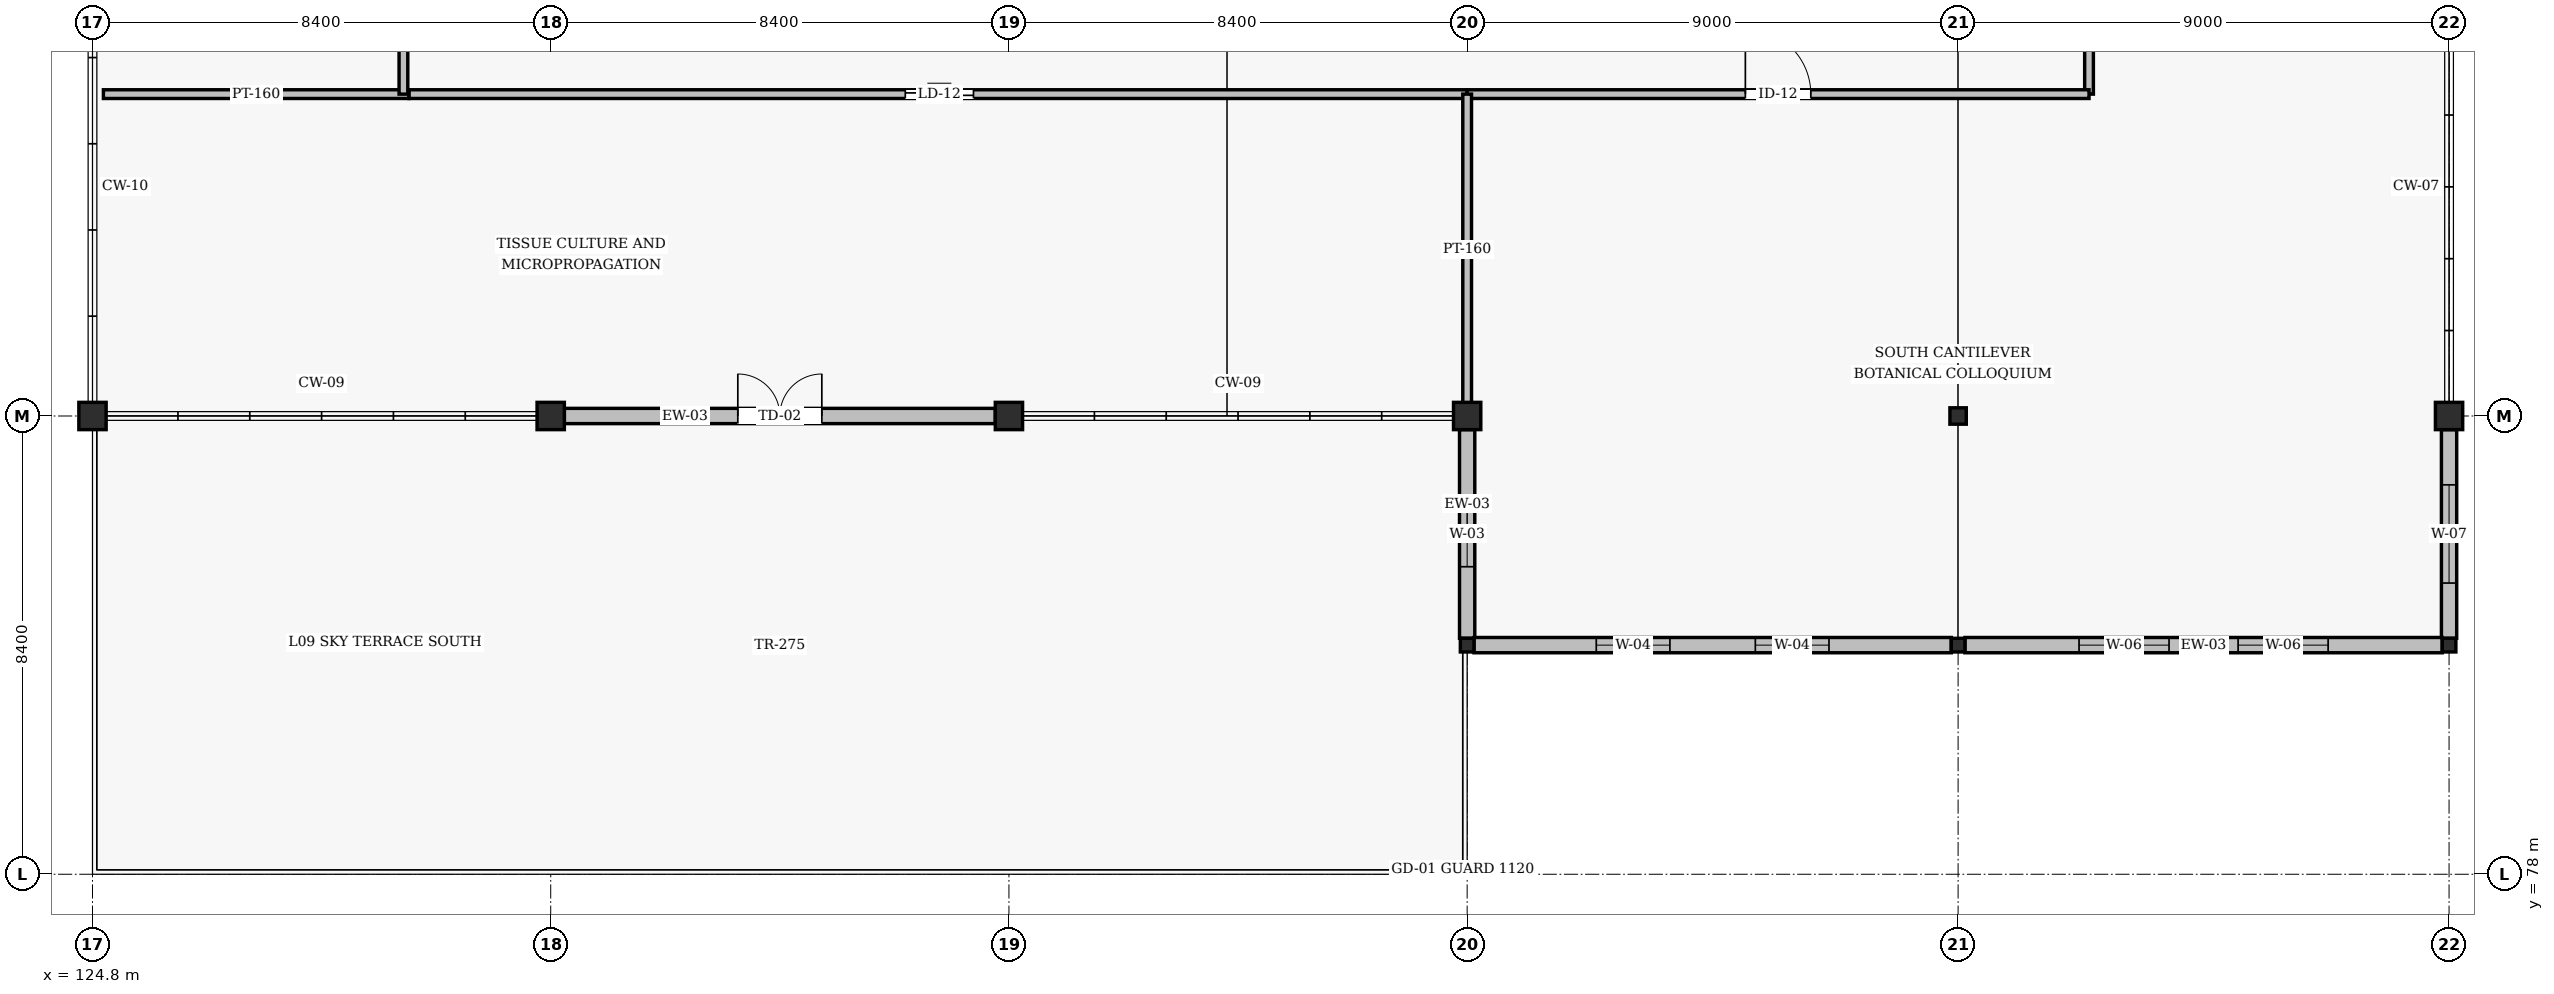
"""IFC4 building model, lengths in metres.
Left out: names, types, materials, properties, quantities, classifications, styles, units other than length and angle.
Written with IfcOpenShell. Run it as: python <this file> out.ifc"""

import sys

from ifc_helpers import new_model, si_unit, direction, frame, frame_2d, origin, origin_2d, place, context, subcontext, project, spatial, rectangle, hollow_rectangle, i_section, extrude, element, fill, save


model = new_model("IFC4")
c1 = context("Model", 3, precision=1e-05, world=origin(), true_north=direction((0.0, 1.0)))
c2 = subcontext(c1, "Body", "Model", "MODEL_VIEW")
j1 = project(units=[si_unit("LENGTHUNIT", "METRE"), si_unit("PLANEANGLEUNIT", "RADIAN")], contexts=[c1])
p1 = place(None, origin())
s1 = spatial("IfcSite", under=j1, at=p1, CompositionType="ELEMENT")
p2 = place(p1, origin())
s2 = spatial("IfcBuilding", under=s1, at=p2, CompositionType="ELEMENT")
p3 = place(p2, frame((0.0, 0.0, 35.4)))
s3 = spatial("IfcBuildingStorey", under=s2, at=p3, CompositionType="ELEMENT", Elevation=35.4)
for number, where, z_axis, x_axis in (
    (1, (124.8, 86.4, 0.0), (0.0, 0.0, 1.0), (1.0, 0.0, 0.0)),
    (2, (133.2, 86.4, 0.0), (0.0, 0.0, 1.0), (1.0, 0.0, 0.0)),
    (3, (141.6, 86.4, 0.0), (0.0, 0.0, 1.0), (1.0, 0.0, 0.0)),
):
    element("IfcColumn", number, at=place(p3, frame(where, z_axis=z_axis, x_axis=x_axis)), inside=s3, PredefinedType="COLUMN", context=c2, shape_type="SweptSolid", body=[
        extrude(hollow_rectangle(XDim=0.5, YDim=0.5, WallThickness=0.02, InnerFilletRadius=0.02, OuterFilletRadius=0.04, at=origin_2d()), origin(), (0.0, 0.0, 1.0), 4.2),
    ])
p4 = place(p3, frame((150.0, 82.2, -0.305), z_axis=(0.0, 0.0, 1.0), x_axis=(1.0, 0.0, 0.0)))
e4 = element("IfcColumn", 4, at=p4, inside=s3, PredefinedType="COLUMN", context=c2, shape_type="SweptSolid", body=[
    extrude(i_section(OverallWidth=0.25, OverallDepth=0.25, WebThickness=0.009, FlangeThickness=0.014, FilletRadius=0.016, at=origin_2d()), origin(), (0.0, 0.0, 1.0), 4.505),
])
p5 = place(p3, frame((150.0, 86.4, 0.0), z_axis=(0.0, 0.0, 1.0), x_axis=(1.0, 0.0, 0.0)))
e5 = element("IfcColumn", 5, at=p5, inside=s3, PredefinedType="COLUMN", context=c2, shape_type="SweptSolid", body=[
    extrude(hollow_rectangle(XDim=0.5, YDim=0.5, WallThickness=0.02, InnerFilletRadius=0.02, OuterFilletRadius=0.04, at=origin_2d()), origin(), (0.0, 0.0, 1.0), 4.2),
])
p6 = place(p3, frame((159.0, 82.2, -0.305), z_axis=(0.0, 0.0, 1.0), x_axis=(1.0, 0.0, 0.0)))
e6 = element("IfcColumn", 6, at=p6, inside=s3, PredefinedType="COLUMN", context=c2, shape_type="SweptSolid", body=[
    extrude(i_section(OverallWidth=0.25, OverallDepth=0.25, WebThickness=0.009, FlangeThickness=0.014, FilletRadius=0.016, at=origin_2d()), origin(), (0.0, 0.0, 1.0), 4.505),
])
p7 = place(p3, frame((159.0, 86.4, 0.0), z_axis=(0.0, 0.0, 1.0), x_axis=(1.0, 0.0, 0.0)))
e7 = element("IfcColumn", 7, at=p7, inside=s3, PredefinedType="COLUMN", context=c2, shape_type="SweptSolid", body=[
    extrude(i_section(OverallWidth=0.3, OverallDepth=0.3, WebThickness=0.01, FlangeThickness=0.015, FilletRadius=0.018, at=origin_2d()), origin(), (0.0, 0.0, 1.0), 4.2),
])
p8 = place(p3, frame((168.0, 82.2, -0.305), z_axis=(0.0, 0.0, 1.0), x_axis=(1.0, 0.0, 0.0)))
e8 = element("IfcColumn", 8, at=p8, inside=s3, PredefinedType="COLUMN", context=c2, shape_type="SweptSolid", body=[
    extrude(i_section(OverallWidth=0.25, OverallDepth=0.25, WebThickness=0.009, FlangeThickness=0.014, FilletRadius=0.016, at=origin_2d()), origin(), (0.0, 0.0, 1.0), 4.505),
])
p9 = place(p3, frame((168.0, 86.4, 0.0), z_axis=(0.0, 0.0, 1.0), x_axis=(1.0, 0.0, 0.0)))
e9 = element("IfcColumn", 9, at=p9, inside=s3, PredefinedType="COLUMN", context=c2, shape_type="SweptSolid", body=[
    extrude(hollow_rectangle(XDim=0.5, YDim=0.5, WallThickness=0.02, InnerFilletRadius=0.02, OuterFilletRadius=0.04, at=origin_2d()), origin(), (0.0, 0.0, 1.0), 4.2),
])
p10 = place(p3, frame((168.0, 82.325, 0.0), z_axis=(0.0, 0.0, 1.0), x_axis=(0.0, 1.0, 0.0)))
e10 = element("IfcWall", 10, at=p10, inside=s3, PredefinedType="SOLIDWALL", context=c2, shape_type="SweptSolid", body=[
    extrude(rectangle(XDim=3.825, YDim=0.28, at=frame_2d((1.913, 0.0))), origin(), (0.0, 0.0, 1.0), 3.454),
])
p11 = place(p10, frame((1.013, 0.0, 0.85)))
e11 = element("IfcOpeningElement", 11, at=p11, cuts=e10, PredefinedType="OPENING", context=c2, shape_type="SweptSolid", body=[
    extrude(rectangle(XDim=1.8, YDim=2.1, at=frame_2d((0.9, 1.05))), frame((0.0, 0.15, 0.0), z_axis=(0.0, -1.0, 0.0), x_axis=(1.0, 0.0, 0.0)), (0.0, 0.0, 1.0), 0.3),
])
p12 = place(p3, frame((133.45, 86.4, 0.0), z_axis=(0.0, 0.0, 1.0), x_axis=(1.0, 0.0, 0.0)))
e12 = element("IfcWall", 12, at=p12, inside=s3, PredefinedType="SOLIDWALL", context=c2, shape_type="SweptSolid", body=[
    extrude(rectangle(XDim=7.9, YDim=0.28, at=frame_2d((3.95, 0.0))), origin(), (0.0, 0.0, 1.0), 3.448),
])
p13 = place(p12, frame((3.18, 0.0, 0.0)))
e13 = element("IfcOpeningElement", 13, at=p13, cuts=e12, PredefinedType="OPENING", context=c2, shape_type="SweptSolid", body=[
    extrude(rectangle(XDim=1.54, YDim=2.24, at=frame_2d((0.77, 1.12))), frame((0.0, 0.15, 0.0), z_axis=(0.0, -1.0, 0.0), x_axis=(1.0, 0.0, 0.0)), (0.0, 0.0, 1.0), 0.3),
])
p14 = place(p3, frame((150.0, 86.15, 0.0), z_axis=(0.0, 0.0, 1.0), x_axis=(0.0, -1.0, 0.0)))
e14 = element("IfcWall", 14, at=p14, inside=s3, PredefinedType="SOLIDWALL", context=c2, shape_type="SweptSolid", body=[
    extrude(rectangle(XDim=3.825, YDim=0.28, at=frame_2d((1.913, 0.0))), origin(), (0.0, 0.0, 1.0), 3.454),
])
p15 = place(p14, frame((1.313, 0.0, 0.85)))
e15 = element("IfcOpeningElement", 15, at=p15, cuts=e14, PredefinedType="OPENING", context=c2, shape_type="SweptSolid", body=[
    extrude(rectangle(XDim=1.2, YDim=2.1, at=frame_2d((0.6, 1.05))), frame((0.0, 0.15, 0.0), z_axis=(0.0, -1.0, 0.0), x_axis=(1.0, 0.0, 0.0)), (0.0, 0.0, 1.0), 0.3),
])
p16 = place(p3, frame((150.125, 82.2, 0.0), z_axis=(0.0, 0.0, 1.0), x_axis=(1.0, 0.0, 0.0)))
e16 = element("IfcWall", 16, at=p16, inside=s3, PredefinedType="SOLIDWALL", context=c2, shape_type="SweptSolid", body=[
    extrude(rectangle(XDim=8.75, YDim=0.28, at=frame_2d((4.375, 0.0))), origin(), (0.0, 0.0, 1.0), 3.156),
])
p17 = place(p16, frame((2.242, 0.0, 0.85)))
e17 = element("IfcOpeningElement", 17, at=p17, cuts=e16, PredefinedType="OPENING", context=c2, shape_type="SweptSolid", body=[
    extrude(rectangle(XDim=1.35, YDim=2.01, at=frame_2d((0.675, 1.005))), frame((0.0, 0.15, 0.0), z_axis=(0.0, -1.0, 0.0), x_axis=(1.0, 0.0, 0.0)), (0.0, 0.0, 1.0), 0.3),
])
p18 = place(p16, frame((5.158, 0.0, 0.85)))
e18 = element("IfcOpeningElement", 18, at=p18, cuts=e16, PredefinedType="OPENING", context=c2, shape_type="SweptSolid", body=[
    extrude(rectangle(XDim=1.35, YDim=2.01, at=frame_2d((0.675, 1.005))), frame((0.0, 0.15, 0.0), z_axis=(0.0, -1.0, 0.0), x_axis=(1.0, 0.0, 0.0)), (0.0, 0.0, 1.0), 0.3),
])
p19 = place(p3, frame((159.125, 82.2, 0.0), z_axis=(0.0, 0.0, 1.0), x_axis=(1.0, 0.0, 0.0)))
e19 = element("IfcWall", 19, at=p19, inside=s3, PredefinedType="SOLIDWALL", context=c2, shape_type="SweptSolid", body=[
    extrude(rectangle(XDim=8.75, YDim=0.28, at=frame_2d((4.375, 0.0))), origin(), (0.0, 0.0, 1.0), 3.156),
])
p20 = place(p19, frame((2.092, 0.0, 0.85)))
e20 = element("IfcOpeningElement", 20, at=p20, cuts=e19, PredefinedType="OPENING", context=c2, shape_type="SweptSolid", body=[
    extrude(rectangle(XDim=1.65, YDim=2.01, at=frame_2d((0.825, 1.005))), frame((0.0, 0.15, 0.0), z_axis=(0.0, -1.0, 0.0), x_axis=(1.0, 0.0, 0.0)), (0.0, 0.0, 1.0), 0.3),
])
p21 = place(p19, frame((5.008, 0.0, 0.85)))
e21 = element("IfcOpeningElement", 21, at=p21, cuts=e19, PredefinedType="OPENING", context=c2, shape_type="SweptSolid", body=[
    extrude(rectangle(XDim=1.65, YDim=2.01, at=frame_2d((0.825, 1.005))), frame((0.0, 0.15, 0.0), z_axis=(0.0, -1.0, 0.0), x_axis=(1.0, 0.0, 0.0)), (0.0, 0.0, 1.0), 0.3),
])
p22 = place(p3, frame((161.4, 92.3, 0.0), z_axis=(0.0, 0.0, 1.0), x_axis=(0.0, 1.0, 0.0)))
e22 = element("IfcWall", 22, at=p22, inside=s3, PredefinedType="PARTITIONING", context=c2, shape_type="SweptSolid", body=[
    extrude(rectangle(XDim=14.1, YDim=0.16, at=frame_2d((7.05, 0.0))), origin(), (0.0, 0.0, 1.0), 3.348),
])
p23 = place(p22, frame((6.5, 0.0, 0.0)))
e23 = element("IfcOpeningElement", 23, at=p23, cuts=e22, PredefinedType="OPENING", context=c2, shape_type="SweptSolid", body=[
    extrude(rectangle(XDim=1.08, YDim=2.08, at=frame_2d((0.54, 1.04))), frame((0.0, 0.09, 0.0), z_axis=(0.0, -1.0, 0.0), x_axis=(1.0, 0.0, 0.0)), (0.0, 0.0, 1.0), 0.18),
])
p24 = place(p3, frame((130.6, 92.3, 0.0), z_axis=(0.0, 0.0, 1.0), x_axis=(1.0, 0.0, 0.0)))
e24 = element("IfcWall", 24, at=p24, inside=s3, PredefinedType="PARTITIONING", context=c2, shape_type="SweptSolid", body=[
    extrude(rectangle(XDim=19.4, YDim=0.16, at=frame_2d((9.7, 0.0))), origin(), (0.0, 0.0, 1.0), 3.448),
])
p25 = place(p24, frame((9.1, 0.0, 0.0)))
e25 = element("IfcOpeningElement", 25, at=p25, cuts=e24, PredefinedType="OPENING", context=c2, shape_type="SweptSolid", body=[
    extrude(rectangle(XDim=1.25, YDim=2.12, at=frame_2d((0.625, 1.06))), frame((0.0, 0.09, 0.0), z_axis=(0.0, -1.0, 0.0), x_axis=(1.0, 0.0, 0.0)), (0.0, 0.0, 1.0), 0.18),
])
p26 = place(p3, frame((150.0, 92.3, 0.0), z_axis=(0.0, 0.0, 1.0), x_axis=(1.0, 0.0, 0.0)))
e26 = element("IfcWall", 26, at=p26, inside=s3, PredefinedType="PARTITIONING", context=c2, shape_type="SweptSolid", body=[
    extrude(rectangle(XDim=11.4, YDim=0.16, at=frame_2d((5.7, 0.0))), origin(), (0.0, 0.0, 1.0), 3.448),
])
p27 = place(p26, frame((5.1, 0.0, 0.0)))
e27 = element("IfcOpeningElement", 27, at=p27, cuts=e26, PredefinedType="OPENING", context=c2, shape_type="SweptSolid", body=[
    extrude(rectangle(XDim=1.2, YDim=2.08, at=frame_2d((0.6, 1.04))), frame((0.0, 0.09, 0.0), z_axis=(0.0, -1.0, 0.0), x_axis=(1.0, 0.0, 0.0)), (0.0, 0.0, 1.0), 0.18),
])
p28 = place(p3, frame((125.0, 92.3, 0.0), z_axis=(0.0, 0.0, 1.0), x_axis=(1.0, 0.0, 0.0)))
e28 = element("IfcWall", 28, at=p28, inside=s3, PredefinedType="PARTITIONING", context=c2, shape_type="SweptSolid", body=[
    extrude(rectangle(XDim=5.6, YDim=0.16, at=frame_2d((2.8, 0.0))), origin(), (0.0, 0.0, 1.0), 3.948),
])
p29 = place(p3, frame((150.0, 86.6, 0.0), z_axis=(0.0, 0.0, 1.0), x_axis=(0.0, 1.0, 0.0)))
e29 = element("IfcWall", 29, at=p29, inside=s3, PredefinedType="PARTITIONING", context=c2, shape_type="SweptSolid", body=[
    extrude(rectangle(XDim=5.7, YDim=0.16, at=frame_2d((2.85, 0.0))), origin(), (0.0, 0.0, 1.0), 3.448),
])
p30 = place(p3, frame((130.5, 92.3, 0.0), z_axis=(0.0, 0.0, 1.0), x_axis=(0.0, 1.0, 0.0)))
e30 = element("IfcWall", 30, at=p30, inside=s3, PredefinedType="PARTITIONING", context=c2, shape_type="SweptSolid", body=[
    extrude(rectangle(XDim=14.2, YDim=0.16, at=frame_2d((7.1, 0.0))), origin(), (0.0, 0.0, 1.0), 3.452),
])
p31 = place(p30, frame((6.55, 0.0, 0.0)))
e31 = element("IfcOpeningElement", 31, at=p31, cuts=e30, PredefinedType="OPENING", context=c2, shape_type="SweptSolid", body=[
    extrude(rectangle(XDim=1.14, YDim=2.12, at=frame_2d((0.57, 1.06))), frame((0.0, 0.09, 0.0), z_axis=(0.0, -1.0, 0.0), x_axis=(1.0, 0.0, 0.0)), (0.0, 0.0, 1.0), 0.18),
])
p32 = place(p11, origin())
e32 = element("IfcWindow", 32, at=p32, inside=s3, PartitioningType="SINGLE_PANEL", PredefinedType="WINDOW", context=c2, shape_type="SweptSolid", body=[
    extrude(rectangle(XDim=1.8, YDim=2.1, at=frame_2d((0.9, 1.05))), frame((0.0, 0.03, 0.0), z_axis=(0.0, -1.0, 0.0), x_axis=(1.0, 0.0, 0.0)), (0.0, 0.0, 1.0), 0.06),
])
fill(e11, e32)
p33 = place(p13, frame((1.54, 0.0, 0.0), z_axis=(0.0, 0.0, 1.0), x_axis=(-1.0, 0.0, 0.0)))
e33 = element("IfcDoor", 33, at=p33, inside=s3, OperationType="DOUBLE_DOOR_SINGLE_SWING", PredefinedType="DOOR", context=c2, shape_type="SweptSolid", body=[
    extrude(rectangle(XDim=1.54, YDim=2.24, at=frame_2d((0.77, 1.12))), frame((0.0, 0.025, 0.0), z_axis=(0.0, -1.0, 0.0), x_axis=(1.0, 0.0, 0.0)), (0.0, 0.0, 1.0), 0.05),
])
fill(e13, e33)
p34 = place(p15, origin())
e34 = element("IfcWindow", 34, at=p34, inside=s3, PartitioningType="SINGLE_PANEL", PredefinedType="WINDOW", context=c2, shape_type="SweptSolid", body=[
    extrude(rectangle(XDim=1.2, YDim=2.1, at=frame_2d((0.6, 1.05))), frame((0.0, 0.03, 0.0), z_axis=(0.0, -1.0, 0.0), x_axis=(1.0, 0.0, 0.0)), (0.0, 0.0, 1.0), 0.06),
])
fill(e15, e34)
p35 = place(p17, origin())
e35 = element("IfcWindow", 35, at=p35, inside=s3, PartitioningType="SINGLE_PANEL", PredefinedType="WINDOW", context=c2, shape_type="SweptSolid", body=[
    extrude(rectangle(XDim=1.35, YDim=2.01, at=frame_2d((0.675, 1.005))), frame((0.0, 0.03, 0.0), z_axis=(0.0, -1.0, 0.0), x_axis=(1.0, 0.0, 0.0)), (0.0, 0.0, 1.0), 0.06),
])
fill(e17, e35)
p36 = place(p18, origin())
e36 = element("IfcWindow", 36, at=p36, inside=s3, PartitioningType="SINGLE_PANEL", PredefinedType="WINDOW", context=c2, shape_type="SweptSolid", body=[
    extrude(rectangle(XDim=1.35, YDim=2.01, at=frame_2d((0.675, 1.005))), frame((0.0, 0.03, 0.0), z_axis=(0.0, -1.0, 0.0), x_axis=(1.0, 0.0, 0.0)), (0.0, 0.0, 1.0), 0.06),
])
fill(e18, e36)
p37 = place(p20, origin())
e37 = element("IfcWindow", 37, at=p37, inside=s3, PartitioningType="SINGLE_PANEL", PredefinedType="WINDOW", context=c2, shape_type="SweptSolid", body=[
    extrude(rectangle(XDim=1.65, YDim=2.01, at=frame_2d((0.825, 1.005))), frame((0.0, 0.03, 0.0), z_axis=(0.0, -1.0, 0.0), x_axis=(1.0, 0.0, 0.0)), (0.0, 0.0, 1.0), 0.06),
])
fill(e20, e37)
p38 = place(p21, origin())
e38 = element("IfcWindow", 38, at=p38, inside=s3, PartitioningType="SINGLE_PANEL", PredefinedType="WINDOW", context=c2, shape_type="SweptSolid", body=[
    extrude(rectangle(XDim=1.65, YDim=2.01, at=frame_2d((0.825, 1.005))), frame((0.0, 0.03, 0.0), z_axis=(0.0, -1.0, 0.0), x_axis=(1.0, 0.0, 0.0)), (0.0, 0.0, 1.0), 0.06),
])
fill(e21, e38)
p39 = place(p25, origin())
e39 = element("IfcDoor", 39, at=p39, inside=s3, OperationType="SINGLE_SWING_LEFT", PredefinedType="DOOR", context=c2, shape_type="SweptSolid", body=[
    extrude(rectangle(XDim=1.25, YDim=2.12, at=frame_2d((0.625, 1.06))), frame((0.0, 0.025, 0.0), z_axis=(0.0, -1.0, 0.0), x_axis=(1.0, 0.0, 0.0)), (0.0, 0.0, 1.0), 0.05),
])
fill(e25, e39)
p40 = place(p27, origin())
e40 = element("IfcDoor", 40, at=p40, inside=s3, OperationType="SINGLE_SWING_LEFT", PredefinedType="DOOR", context=c2, shape_type="SweptSolid", body=[
    extrude(rectangle(XDim=1.2, YDim=2.08, at=frame_2d((0.6, 1.04))), frame((0.0, 0.025, 0.0), z_axis=(0.0, -1.0, 0.0), x_axis=(1.0, 0.0, 0.0)), (0.0, 0.0, 1.0), 0.05),
])
fill(e27, e40)
save(model, sys.argv[1])
